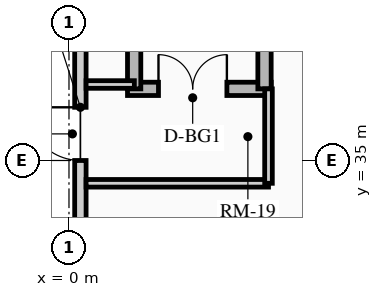
"""IFC4 building model, lengths in metres.
Left out: names, types, materials, properties, quantities, classifications, styles, units other than length and angle.
Written with IfcOpenShell. Run it as: python <this file> out.ifc"""

import sys

from ifc_helpers import new_model, si_unit, direction, frame, frame_2d, origin, place, context, subcontext, project, spatial, rectangle, extrude, source, transform, mapped, element, fill, save


model = new_model("IFC4")
c1 = context("Model", 3, precision=1e-05, world=origin(), true_north=direction((0.0, 1.0)))
c2 = subcontext(c1, "Body", "Model", "MODEL_VIEW")
j1 = project(units=[si_unit("LENGTHUNIT", "METRE"), si_unit("PLANEANGLEUNIT", "RADIAN")], contexts=[c1])
p1 = place(None, origin())
s1 = spatial("IfcSite", under=j1, at=p1, CompositionType="ELEMENT")
p2 = place(p1, origin())
s2 = spatial("IfcBuilding", under=s1, at=p2, CompositionType="ELEMENT")
p3 = place(p2, origin())
s3 = spatial("IfcBuildingStorey", under=s2, at=p3, CompositionType="ELEMENT", Elevation=0.0)
p4 = place(p3, frame((1.54, 36.885, 0.0), z_axis=(0.0, 0.0, 1.0), x_axis=(1.0, 0.0, 0.0)))
e1 = element("IfcWall", 1, at=p4, inside=s3, PredefinedType="SHEAR", context=c2, shape_type="SweptSolid", body=[
    extrude(rectangle(XDim=3.78, YDim=0.35, at=frame_2d((1.89, 0.0))), origin(), (0.0, 0.0, 1.0), 4.8),
])
m1 = source(origin(), c2, "Body", "SweptSolid", [
    extrude(rectangle(XDim=1.8, YDim=2.05, at=frame_2d((0.9, 1.025))), frame((0.0, 0.185, 0.0), z_axis=(0.0, -1.0, 0.0), x_axis=(1.0, 0.0, 0.0)), (0.0, 0.0, 1.0), 0.37),
])
p5 = place(p4, frame((0.815, 0.0, 0.0)))
e2 = element("IfcOpeningElement", 2, at=p5, cuts=e1, PredefinedType="OPENING", context=c2, shape_type="MappedRepresentation", body=[
    mapped(m1, transform((0.0, 0.0, 0.0), x_axis=(1.0, 0.0, 0.0), y_axis=(0.0, 1.0, 0.0), z_axis=(0.0, 0.0, 1.0), scale=1.0)),
])
for number, where, z_axis, x_axis in (
    (3, (1.715, 36.885, 0.0), (0.0, 0.0, 1.0), (0.0, 1.0, 0.0)),
    (4, (5.145, 36.885, 0.0), (0.0, 0.0, 1.0), (0.0, 1.0, 0.0)),
):
    element("IfcWall", number, at=place(p3, frame(where, z_axis=z_axis, x_axis=x_axis)), inside=s3, PredefinedType="SHEAR", context=c2, shape_type="SweptSolid", body=[
        extrude(rectangle(XDim=6.93, YDim=0.35, at=frame_2d((3.465, 0.0))), origin(), (0.0, 0.0, 1.0), 4.8),
    ])
p6 = place(p3, frame((0.3, 4.5, 0.0), z_axis=(0.0, 0.0, 1.0), x_axis=(0.0, 1.0, 0.0)))
e5 = element("IfcWall", 5, at=p6, inside=s3, PredefinedType="SOLIDWALL", context=c2, shape_type="SweptSolid", body=[
    extrude(rectangle(XDim=40.0, YDim=0.3, at=frame_2d((20.0, 0.0))), origin(), (0.0, 0.0, 1.0), 4.485),
])
m2 = source(origin(), c2, "Body", "SweptSolid", [
    extrude(rectangle(XDim=1.4, YDim=2.15, at=frame_2d((0.7, 1.075))), frame((0.0, 0.16, 0.0), z_axis=(0.0, -1.0, 0.0), x_axis=(1.0, 0.0, 0.0)), (0.0, 0.0, 1.0), 0.32),
])
p7 = place(p6, frame((30.5, 0.0, 0.0)))
e6 = element("IfcOpeningElement", 6, at=p7, cuts=e5, PredefinedType="OPENING", context=c2, shape_type="MappedRepresentation", body=[
    mapped(m2, transform((0.0, 0.0, 0.0), x_axis=(1.0, 0.0, 0.0), y_axis=(0.0, 1.0, 0.0), z_axis=(0.0, 0.0, 1.0), scale=1.0)),
])
m3 = source(origin(), c2, "Body", "SweptSolid", [
    extrude(rectangle(XDim=2.0, YDim=2.25, at=frame_2d((1.0, 1.125))), frame((0.0, 0.16, 0.0), z_axis=(0.0, -1.0, 0.0), x_axis=(1.0, 0.0, 0.0)), (0.0, 0.0, 1.0), 0.32),
])
p8 = place(p6, frame((10.5, 0.0, 0.0)))
e7 = element("IfcOpeningElement", 7, at=p8, cuts=e5, PredefinedType="OPENING", context=c2, shape_type="MappedRepresentation", body=[
    mapped(m3, transform((0.0, 0.0, 0.0), x_axis=(1.0, 0.0, 0.0), y_axis=(0.0, 1.0, 0.0), z_axis=(0.0, 0.0, 1.0), scale=1.0)),
])
p9 = place(p6, frame((22.35, 0.0, 0.0)))
e8 = element("IfcOpeningElement", 8, at=p9, cuts=e5, PredefinedType="OPENING", context=c2, shape_type="MappedRepresentation", body=[
    mapped(m3, transform((0.0, 0.0, 0.0), x_axis=(1.0, 0.0, 0.0), y_axis=(0.0, 1.0, 0.0), z_axis=(0.0, 0.0, 1.0), scale=1.0)),
])
p10 = place(p6, frame((16.5, 0.0, 0.0)))
e9 = element("IfcOpeningElement", 9, at=p10, cuts=e5, PredefinedType="OPENING", context=c2, shape_type="MappedRepresentation", body=[
    mapped(m3, transform((0.0, 0.0, 0.0), x_axis=(1.0, 0.0, 0.0), y_axis=(0.0, 1.0, 0.0), z_axis=(0.0, 0.0, 1.0), scale=1.0)),
])
m4 = source(origin(), c2, "Body", "SweptSolid", [
    extrude(rectangle(XDim=3.4, YDim=3.0, at=frame_2d((1.7, 1.5))), frame((0.0, 0.16, 0.0), z_axis=(0.0, -1.0, 0.0), x_axis=(1.0, 0.0, 0.0)), (0.0, 0.0, 1.0), 0.32),
])
p11 = place(p6, frame((3.5, 0.0, 0.0)))
e10 = element("IfcOpeningElement", 10, at=p11, cuts=e5, PredefinedType="OPENING", context=c2, shape_type="MappedRepresentation", body=[
    mapped(m4, transform((0.0, 0.0, 0.0), x_axis=(1.0, 0.0, 0.0), y_axis=(0.0, 1.0, 0.0), z_axis=(0.0, 0.0, 1.0), scale=1.0)),
])
p12 = place(p3, frame((0.45, 34.4, 0.0), z_axis=(0.0, 0.0, 1.0), x_axis=(1.0, 0.0, 0.0)))
e11 = element("IfcWall", 11, at=p12, inside=s3, PredefinedType="PARTITIONING", context=c2, shape_type="SweptSolid", body=[
    extrude(rectangle(XDim=4.8, YDim=0.2, at=frame_2d((2.4, 0.0))), origin(), (0.0, 0.0, 1.0), 4.485),
])
p13 = place(p3, frame((5.25, 34.4, 0.0), z_axis=(0.0, 0.0, 1.0), x_axis=(0.0, 1.0, 0.0)))
e12 = element("IfcWall", 12, at=p13, inside=s3, PredefinedType="PARTITIONING", context=c2, shape_type="SweptSolid", body=[
    extrude(rectangle(XDim=2.485, YDim=0.2, at=frame_2d((1.243, 0.0))), origin(), (0.0, 0.0, 1.0), 4.485),
])
p14 = place(p3, frame((0.45, 37.0, 0.0), z_axis=(0.0, 0.0, 1.0), x_axis=(1.0, 0.0, 0.0)))
e13 = element("IfcWall", 13, at=p14, inside=s3, PredefinedType="PARTITIONING", context=c2, shape_type="SweptSolid", body=[
    extrude(rectangle(XDim=1.27, YDim=0.2, at=frame_2d((0.635, 0.0))), origin(), (0.0, 0.0, 1.0), 4.485),
])
m5 = source(origin(), c2, "Body", "SweptSolid", [
    extrude(rectangle(XDim=1.4, YDim=2.15, at=frame_2d((0.7, 1.075))), frame((0.0, 0.025, 0.0), z_axis=(0.0, -1.0, 0.0), x_axis=(1.0, 0.0, 0.0)), (0.0, 0.0, 1.0), 0.05),
])
p15 = place(p7, origin())
e14 = element("IfcDoor", 14, at=p15, inside=s3, OperationType="SINGLE_SWING_RIGHT", PredefinedType="DOOR", context=c2, shape_type="MappedRepresentation", body=[
    mapped(m5, transform((0.0, 0.0, 0.0), x_axis=(1.0, 0.0, 0.0), y_axis=(0.0, 1.0, 0.0), z_axis=(0.0, 0.0, 1.0), scale=1.0)),
])
fill(e6, e14)
m6 = source(origin(), c2, "Body", "SweptSolid", [
    extrude(rectangle(XDim=1.8, YDim=2.05, at=frame_2d((0.9, 1.025))), frame((0.0, 0.025, 0.0), z_axis=(0.0, -1.0, 0.0), x_axis=(1.0, 0.0, 0.0)), (0.0, 0.0, 1.0), 0.05),
])
p16 = place(p5, origin())
e15 = element("IfcDoor", 15, at=p16, inside=s3, OperationType="DOUBLE_DOOR_SINGLE_SWING", PredefinedType="DOOR", context=c2, shape_type="MappedRepresentation", body=[
    mapped(m6, transform((0.0, 0.0, 0.0), x_axis=(1.0, 0.0, 0.0), y_axis=(0.0, 1.0, 0.0), z_axis=(0.0, 0.0, 1.0), scale=1.0)),
])
fill(e2, e15)
save(model, sys.argv[1])
